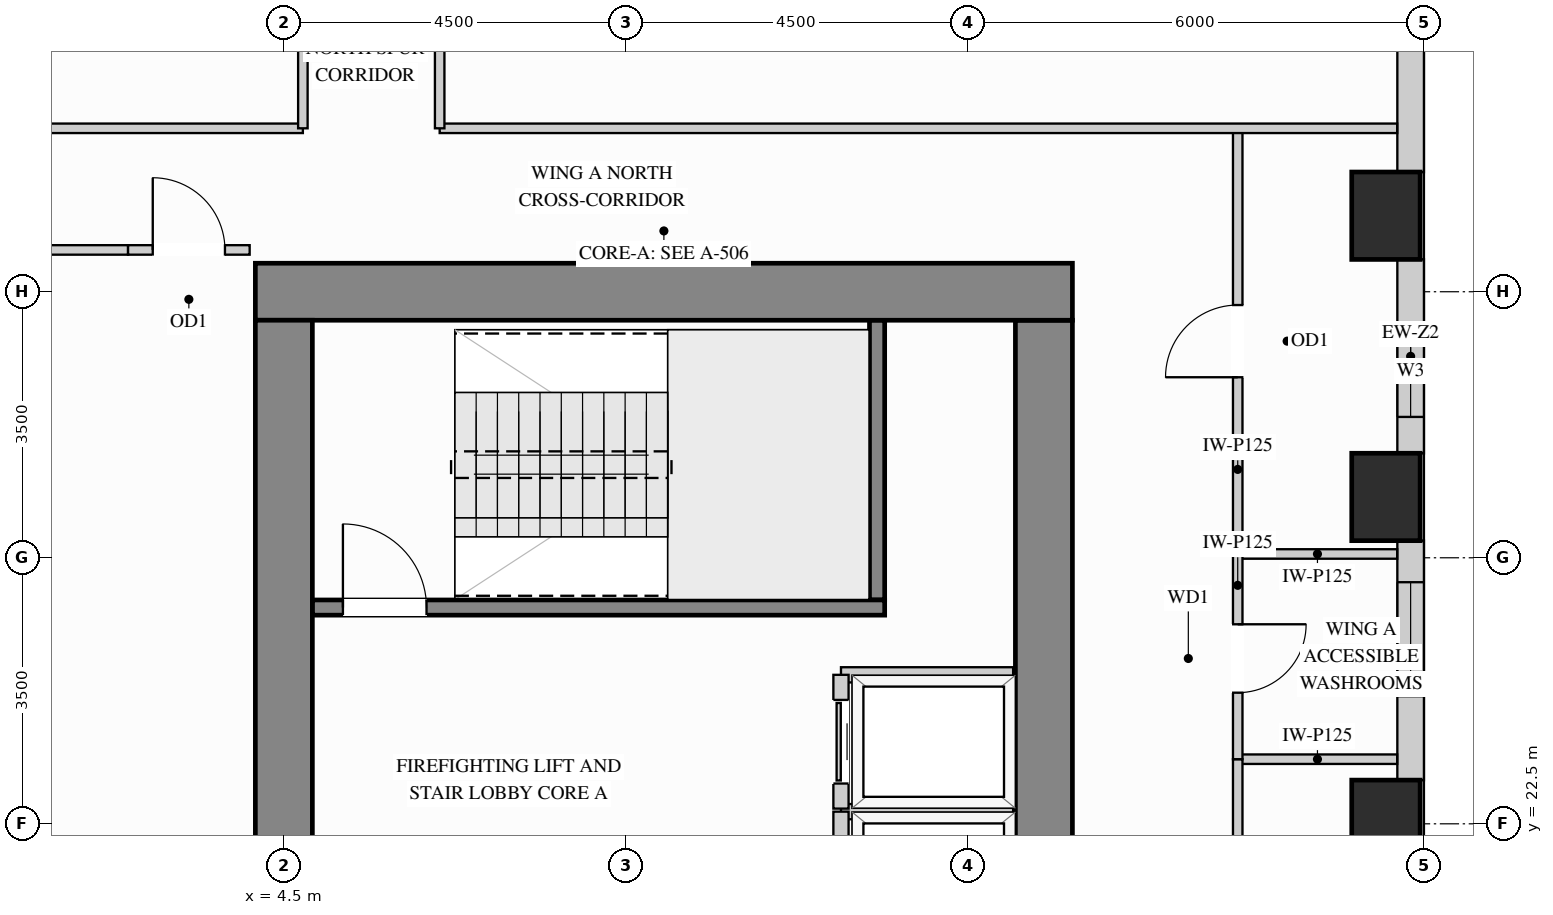
"""IFC4 building model, lengths in metres.
Left out: names, types, materials, properties, quantities, classifications, styles, units other than length and angle.
Written with IfcOpenShell. Run it as: python <this file> out.ifc"""

import sys

from ifc_helpers import new_model, si_unit, direction, frame, frame_2d, origin, origin_2d, place, context, subcontext, project, spatial, rectangle, extrude, source, transform, mapped, element, fill, save


model = new_model("IFC4")
c1 = context("Model", 3, precision=1e-05, world=origin(), true_north=direction((0.0, 1.0)))
c2 = subcontext(c1, "Body", "Model", "MODEL_VIEW")
j1 = project(units=[si_unit("LENGTHUNIT", "METRE"), si_unit("PLANEANGLEUNIT", "RADIAN")], contexts=[c1])
p1 = place(None, origin())
s1 = spatial("IfcSite", under=j1, at=p1, CompositionType="ELEMENT")
p2 = place(p1, origin())
s2 = spatial("IfcBuilding", under=s1, at=p2, CompositionType="ELEMENT")
p3 = place(p2, frame((0.0, 0.0, 95.4)))
s3 = spatial("IfcBuildingStorey", under=s2, at=p3, CompositionType="ELEMENT", Elevation=95.4)
m1 = source(origin(), c2, "Body", "SweptSolid", [
    extrude(rectangle(XDim=0.9, YDim=1.15, at=origin_2d()), origin(), (0.0, 0.0, 1.0), 3.38),
])
for number, where, z_axis, x_axis in (
    (1, (19.0, 22.5, 0.0), (0.0, 0.0, 1.0), (1.0, 0.0, 0.0)),
    (2, (19.0, 26.8, 0.0), (0.0, 0.0, 1.0), (1.0, 0.0, 0.0)),
    (3, (19.0, 30.5, 0.0), (0.0, 0.0, 1.0), (1.0, 0.0, 0.0)),
):
    element("IfcColumn", number, at=place(p3, frame(where, z_axis=z_axis, x_axis=x_axis)), inside=s3, PredefinedType="COLUMN", context=c2, shape_type="MappedRepresentation", body=[
        mapped(m1, transform((0.0, 0.0, 0.0), x_axis=(1.0, 0.0, 0.0), y_axis=(0.0, 1.0, 0.0), z_axis=(0.0, 0.0, 1.0))),
    ])
m2 = source(origin(), c2, "Body", "SweptSolid", [
    extrude(rectangle(XDim=8.245, YDim=0.75, at=frame_2d((4.123, 0.0))), origin(), (0.0, 0.0, 1.0), 3.38),
])
p4 = place(p3, frame((14.5, 20.88, 0.0), z_axis=(0.0, 0.0, 1.0), x_axis=(0.0, 1.0, 0.0)))
e4 = element("IfcWall", 4, at=p4, inside=s3, PredefinedType="SHEAR", context=c2, shape_type="MappedRepresentation", body=[
    mapped(m2, transform((0.0, 0.0, 0.0), x_axis=(1.0, 0.0, 0.0), y_axis=(0.0, 1.0, 0.0), z_axis=(0.0, 0.0, 1.0))),
])
m3 = source(origin(), c2, "Body", "SweptSolid", [
    extrude(rectangle(XDim=10.75, YDim=0.75, at=frame_2d((5.375, 0.0))), origin(), (0.0, 0.0, 1.0), 3.38),
])
p5 = place(p3, frame((4.125, 29.5, 0.0), z_axis=(0.0, 0.0, 1.0), x_axis=(1.0, 0.0, 0.0)))
e5 = element("IfcWall", 5, at=p5, inside=s3, PredefinedType="SHEAR", context=c2, shape_type="MappedRepresentation", body=[
    mapped(m3, transform((0.0, 0.0, 0.0), x_axis=(1.0, 0.0, 0.0), y_axis=(0.0, 1.0, 0.0), z_axis=(0.0, 0.0, 1.0))),
])
m4 = source(origin(), c2, "Body", "SweptSolid", [
    extrude(rectangle(XDim=20.25, YDim=0.75, at=frame_2d((10.125, 0.0))), origin(), (0.0, 0.0, 1.0), 3.38),
])
p6 = place(p3, frame((4.5, 8.875, 0.0), z_axis=(0.0, 0.0, 1.0), x_axis=(0.0, 1.0, 0.0)))
e6 = element("IfcWall", 6, at=p6, inside=s3, PredefinedType="SHEAR", context=c2, shape_type="MappedRepresentation", body=[
    mapped(m4, transform((0.0, 0.0, 0.0), x_axis=(1.0, 0.0, 0.0), y_axis=(0.0, 1.0, 0.0), z_axis=(0.0, 0.0, 1.0))),
])
p7 = place(p3, frame((19.325, 23.073, 0.0), z_axis=(0.0, 0.0, 1.0), x_axis=(0.0, 1.0, 0.0)))
e7 = element("IfcWall", 7, at=p7, inside=s3, PredefinedType="SOLIDWALL", context=c2, shape_type="SweptSolid", body=[
    extrude(rectangle(XDim=3.154, YDim=0.35, at=frame_2d((1.577, 0.0))), origin(), (0.0, 0.0, 1.0), 2.519),
])
p8 = place(p7, frame((1.105, 0.0, 0.78)))
e8 = element("IfcOpeningElement", 8, at=p8, cuts=e7, PredefinedType="OPENING", context=c2, shape_type="SweptSolid", body=[
    extrude(rectangle(XDim=1.5, YDim=1.559, at=frame_2d((0.75, 0.78))), frame((0.0, 0.185, 0.0), z_axis=(0.0, -1.0, 0.0), x_axis=(1.0, 0.0, 0.0)), (0.0, 0.0, 1.0), 0.37),
])
p9 = place(p3, frame((19.325, 27.373, 0.0), z_axis=(0.0, 0.0, 1.0), x_axis=(0.0, 1.0, 0.0)))
e9 = element("IfcWall", 9, at=p9, inside=s3, PredefinedType="SOLIDWALL", context=c2, shape_type="SweptSolid", body=[
    extrude(rectangle(XDim=2.554, YDim=0.35, at=frame_2d((1.277, 0.0))), origin(), (0.0, 0.0, 1.0), 2.519),
])
p10 = place(p9, frame((0.48, 0.0, 0.78)))
e10 = element("IfcOpeningElement", 10, at=p10, cuts=e9, PredefinedType="OPENING", context=c2, shape_type="SweptSolid", body=[
    extrude(rectangle(XDim=1.2, YDim=1.559, at=frame_2d((0.6, 0.78))), frame((0.0, 0.185, 0.0), z_axis=(0.0, -1.0, 0.0), x_axis=(1.0, 0.0, 0.0)), (0.0, 0.0, 1.0), 0.37),
])
m5 = source(origin(), c2, "Body", "SweptSolid", [
    extrude(rectangle(XDim=3.354, YDim=0.35, at=frame_2d((1.677, 0.0))), origin(), (0.0, 0.0, 1.0), 2.519),
])
p11 = place(p3, frame((19.325, 31.073, 0.0), z_axis=(0.0, 0.0, 1.0), x_axis=(0.0, 1.0, 0.0)))
e11 = element("IfcWall", 11, at=p11, inside=s3, PredefinedType="SOLIDWALL", context=c2, shape_type="MappedRepresentation", body=[
    mapped(m5, transform((0.0, 0.0, 0.0), x_axis=(1.0, 0.0, 0.0), y_axis=(0.0, 1.0, 0.0), z_axis=(0.0, 0.0, 1.0))),
])
m6 = source(origin(), c2, "Body", "SweptSolid", [
    extrude(rectangle(XDim=2.098, YDim=0.125, at=frame_2d((1.049, 0.0))), origin(), (0.0, 0.0, 1.0), 3.365),
])
for number, where, z_axis, x_axis in (
    (12, (17.05, 23.35, 0.0), (0.0, 0.0, 1.0), (1.0, 0.0, 0.0)),
    (13, (17.05, 26.05, 0.0), (0.0, 0.0, 1.0), (1.0, 0.0, 0.0)),
):
    element("IfcWall", number, at=place(p3, frame(where, z_axis=z_axis, x_axis=x_axis)), inside=s3, PredefinedType="PARTITIONING", context=c2, shape_type="MappedRepresentation", body=[
        mapped(m6, transform((0.0, 0.0, 0.0), x_axis=(1.0, 0.0, 0.0), y_axis=(0.0, 1.0, 0.0), z_axis=(0.0, 0.0, 1.0))),
    ])
p12 = place(p3, frame((17.05, 18.8, 0.0), z_axis=(0.0, 0.0, 1.0), x_axis=(0.0, 1.0, 0.0)))
e14 = element("IfcWall", 14, at=p12, inside=s3, PredefinedType="PARTITIONING", context=c2, shape_type="SweptSolid", body=[
    extrude(rectangle(XDim=4.55, YDim=0.125, at=frame_2d((2.275, 0.0))), origin(), (0.0, 0.0, 1.0), 3.365),
])
p13 = place(p12, frame((1.8, 0.0, 0.0)))
e15 = element("IfcOpeningElement", 15, at=p13, cuts=e14, PredefinedType="OPENING", context=c2, shape_type="SweptSolid", body=[
    extrude(rectangle(XDim=0.95, YDim=2.15, at=frame_2d((0.475, 1.075))), frame((0.0, 0.073, 0.0), z_axis=(0.0, -1.0, 0.0), x_axis=(1.0, 0.0, 0.0)), (0.0, 0.0, 1.0), 0.145),
])
p14 = place(p3, frame((17.05, 26.05, 0.0), z_axis=(0.0, 0.0, 1.0), x_axis=(0.0, 1.0, 0.0)))
e16 = element("IfcWall", 16, at=p14, inside=s3, PredefinedType="PARTITIONING", context=c2, shape_type="SweptSolid", body=[
    extrude(rectangle(XDim=5.6, YDim=0.125, at=frame_2d((2.8, 0.0))), origin(), (0.0, 0.0, 1.0), 3.365),
])
p15 = place(p14, frame((2.325, 0.0, 0.0)))
e17 = element("IfcOpeningElement", 17, at=p15, cuts=e16, PredefinedType="OPENING", context=c2, shape_type="SweptSolid", body=[
    extrude(rectangle(XDim=0.95, YDim=2.15, at=frame_2d((0.475, 1.075))), frame((0.0, 0.073, 0.0), z_axis=(0.0, -1.0, 0.0), x_axis=(1.0, 0.0, 0.0)), (0.0, 0.0, 1.0), 0.145),
])
p16 = place(p3, frame((17.05, 23.35, 0.0), z_axis=(0.0, 0.0, 1.0), x_axis=(0.0, 1.0, 0.0)))
e18 = element("IfcWall", 18, at=p16, inside=s3, PredefinedType="PARTITIONING", context=c2, shape_type="SweptSolid", body=[
    extrude(rectangle(XDim=2.7, YDim=0.125, at=frame_2d((1.35, 0.0))), origin(), (0.0, 0.0, 1.0), 3.365),
])
p17 = place(p16, frame((0.875, 0.0, 0.0)))
e19 = element("IfcOpeningElement", 19, at=p17, cuts=e18, PredefinedType="OPENING", context=c2, shape_type="SweptSolid", body=[
    extrude(rectangle(XDim=0.9, YDim=2.15, at=frame_2d((0.45, 1.075))), frame((0.0, 0.073, 0.0), z_axis=(0.0, -1.0, 0.0), x_axis=(1.0, 0.0, 0.0)), (0.0, 0.0, 1.0), 0.145),
])
m7 = source(origin(), c2, "Body", "SweptSolid", [
    extrude(rectangle(XDim=12.598, YDim=0.125, at=frame_2d((6.299, 0.0))), origin(), (0.0, 0.0, 1.0), 2.828),
])
p18 = place(p3, frame((6.55, 31.65, 0.0), z_axis=(0.0, 0.0, 1.0), x_axis=(1.0, 0.0, 0.0)))
e20 = element("IfcWall", 20, at=p18, inside=s3, PredefinedType="PARTITIONING", context=c2, shape_type="MappedRepresentation", body=[
    mapped(m7, transform((0.0, 0.0, 0.0), x_axis=(1.0, 0.0, 0.0), y_axis=(0.0, 1.0, 0.0), z_axis=(0.0, 0.0, 1.0))),
])
m8 = source(origin(), c2, "Body", "SweptSolid", [
    extrude(rectangle(XDim=4.398, YDim=0.125, at=frame_2d((2.199, 0.0))), origin(), (0.0, 0.0, 1.0), 2.828),
])
p19 = place(p3, frame((0.352, 31.65, 0.0), z_axis=(0.0, 0.0, 1.0), x_axis=(1.0, 0.0, 0.0)))
e21 = element("IfcWall", 21, at=p19, inside=s3, PredefinedType="PARTITIONING", context=c2, shape_type="MappedRepresentation", body=[
    mapped(m8, transform((0.0, 0.0, 0.0), x_axis=(1.0, 0.0, 0.0), y_axis=(0.0, 1.0, 0.0), z_axis=(0.0, 0.0, 1.0))),
])
m9 = source(origin(), c2, "Body", "SweptSolid", [
    extrude(rectangle(XDim=1.26, YDim=0.125, at=frame_2d((0.63, 0.0))), origin(), (0.0, 0.0, 1.0), 3.365),
])
p20 = place(p3, frame((1.19, 30.05, 0.0), z_axis=(0.0, 0.0, 1.0), x_axis=(1.0, 0.0, 0.0)))
e22 = element("IfcWall", 22, at=p20, inside=s3, PredefinedType="PARTITIONING", context=c2, shape_type="MappedRepresentation", body=[
    mapped(m9, transform((0.0, 0.0, 0.0), x_axis=(1.0, 0.0, 0.0), y_axis=(0.0, 1.0, 0.0), z_axis=(0.0, 0.0, 1.0))),
])
p21 = place(p3, frame((2.45, 30.05, 0.0), z_axis=(0.0, 0.0, 1.0), x_axis=(1.0, 0.0, 0.0)))
e23 = element("IfcWall", 23, at=p21, inside=s3, PredefinedType="PARTITIONING", context=c2, shape_type="SweptSolid", body=[
    extrude(rectangle(XDim=1.6, YDim=0.125, at=frame_2d((0.8, 0.0))), origin(), (0.0, 0.0, 1.0), 3.365),
])
p22 = place(p21, frame((0.325, 0.0, 0.0)))
e24 = element("IfcOpeningElement", 24, at=p22, cuts=e23, PredefinedType="OPENING", context=c2, shape_type="SweptSolid", body=[
    extrude(rectangle(XDim=0.95, YDim=2.15, at=frame_2d((0.475, 1.075))), frame((0.0, 0.073, 0.0), z_axis=(0.0, -1.0, 0.0), x_axis=(1.0, 0.0, 0.0)), (0.0, 0.0, 1.0), 0.145),
])
p23 = place(p3, frame((6.55, 31.65, 0.0), z_axis=(0.0, 0.0, 1.0), x_axis=(0.0, 1.0, 0.0)))
e25 = element("IfcWall", 25, at=p23, inside=s3, PredefinedType="PARTITIONING", context=c2, shape_type="SweptSolid", body=[
    extrude(rectangle(XDim=5.427, YDim=0.125, at=frame_2d((2.713, 0.0))), origin(), (0.0, 0.0, 1.0), 3.365),
])
p24 = place(p23, frame((2.239, 0.0, 0.0)))
e26 = element("IfcOpeningElement", 26, at=p24, cuts=e25, PredefinedType="OPENING", context=c2, shape_type="SweptSolid", body=[
    extrude(rectangle(XDim=0.95, YDim=2.15, at=frame_2d((0.475, 1.075))), frame((0.0, 0.073, 0.0), z_axis=(0.0, -1.0, 0.0), x_axis=(1.0, 0.0, 0.0)), (0.0, 0.0, 1.0), 0.145),
])
p25 = place(p3, frame((4.75, 31.65, 0.0), z_axis=(0.0, 0.0, 1.0), x_axis=(0.0, 1.0, 0.0)))
e27 = element("IfcWall", 27, at=p25, inside=s3, PredefinedType="PARTITIONING", context=c2, shape_type="SweptSolid", body=[
    extrude(rectangle(XDim=10.05, YDim=0.125, at=frame_2d((5.025, 0.0))), origin(), (0.0, 0.0, 1.0), 3.365),
])
p26 = place(p25, frame((4.245, 0.0, 0.0)))
e28 = element("IfcOpeningElement", 28, at=p26, cuts=e27, PredefinedType="OPENING", context=c2, shape_type="SweptSolid", body=[
    extrude(rectangle(XDim=0.95, YDim=2.15, at=frame_2d((0.475, 1.075))), frame((0.0, 0.073, 0.0), z_axis=(0.0, -1.0, 0.0), x_axis=(1.0, 0.0, 0.0)), (0.0, 0.0, 1.0), 0.145),
])
m10 = source(origin(), c2, "Body", "SweptSolid", [
    extrude(rectangle(XDim=2.265, YDim=0.2, at=frame_2d((1.132, 0.0))), origin(), (0.0, 0.0, 1.0), 3.365),
])
p27 = place(p3, frame((11.83, 22.66, 0.0), z_axis=(0.0, 0.0, 1.0), x_axis=(1.0, 0.0, 0.0)))
e29 = element("IfcWall", 29, at=p27, inside=s3, PredefinedType="PARTITIONING", context=c2, shape_type="MappedRepresentation", body=[
    mapped(m10, transform((0.0, 0.0, 0.0), x_axis=(1.0, 0.0, 0.0), y_axis=(0.0, 1.0, 0.0), z_axis=(0.0, 0.0, 1.0))),
])
p28 = place(p3, frame((11.83, 20.9, 0.0), z_axis=(0.0, 0.0, 1.0), x_axis=(0.0, 1.0, 0.0)))
e30 = element("IfcWall", 30, at=p28, inside=s3, PredefinedType="PARTITIONING", context=c2, shape_type="SweptSolid", body=[
    extrude(rectangle(XDim=1.76, YDim=0.2, at=frame_2d((0.88, 0.0))), origin(), (0.0, 0.0, 1.0), 3.365),
])
p29 = place(p28, frame((0.33, 0.0, 0.0)))
e31 = element("IfcOpeningElement", 31, at=p29, cuts=e30, PredefinedType="OPENING", context=c2, shape_type="SweptSolid", body=[
    extrude(rectangle(XDim=1.1, YDim=2.2, at=frame_2d((0.55, 1.1))), frame((0.0, 0.11, 0.0), z_axis=(0.0, -1.0, 0.0), x_axis=(1.0, 0.0, 0.0)), (0.0, 0.0, 1.0), 0.22),
])
p30 = place(p3, frame((11.83, 24.46, 0.0), z_axis=(0.0, 0.0, 1.0), x_axis=(1.0, 0.0, 0.0)))
e32 = element("IfcWall", 32, at=p30, inside=s3, PredefinedType="PARTITIONING", context=c2, shape_type="MappedRepresentation", body=[
    mapped(m10, transform((0.0, 0.0, 0.0), x_axis=(1.0, 0.0, 0.0), y_axis=(0.0, 1.0, 0.0), z_axis=(0.0, 0.0, 1.0))),
])
p31 = place(p3, frame((11.83, 22.7, 0.0), z_axis=(0.0, 0.0, 1.0), x_axis=(0.0, 1.0, 0.0)))
e33 = element("IfcWall", 33, at=p31, inside=s3, PredefinedType="PARTITIONING", context=c2, shape_type="SweptSolid", body=[
    extrude(rectangle(XDim=1.76, YDim=0.2, at=frame_2d((0.88, 0.0))), origin(), (0.0, 0.0, 1.0), 3.365),
])
p32 = place(p31, frame((0.33, 0.0, 0.0)))
e34 = element("IfcOpeningElement", 34, at=p32, cuts=e33, PredefinedType="OPENING", context=c2, shape_type="SweptSolid", body=[
    extrude(rectangle(XDim=1.1, YDim=2.2, at=frame_2d((0.55, 1.1))), frame((0.0, 0.11, 0.0), z_axis=(0.0, -1.0, 0.0), x_axis=(1.0, 0.0, 0.0)), (0.0, 0.0, 1.0), 0.22),
])
m11 = source(origin(), c2, "Body", "SweptSolid", [
    extrude(rectangle(XDim=3.678, YDim=0.2, at=frame_2d((1.839, 0.0))), origin(), (0.0, 0.0, 1.0), 3.38),
])
p33 = place(p3, frame((12.305, 25.445, 0.0), z_axis=(0.0, 0.0, 1.0), x_axis=(0.0, 1.0, 0.0)))
e35 = element("IfcWall", 35, at=p33, inside=s3, PredefinedType="SHEAR", context=c2, shape_type="MappedRepresentation", body=[
    mapped(m11, transform((0.0, 0.0, 0.0), x_axis=(1.0, 0.0, 0.0), y_axis=(0.0, 1.0, 0.0), z_axis=(0.0, 0.0, 1.0))),
])
p34 = place(p3, frame((4.877, 25.345, 0.0), z_axis=(0.0, 0.0, 1.0), x_axis=(1.0, 0.0, 0.0)))
e36 = element("IfcWall", 36, at=p34, inside=s3, PredefinedType="SHEAR", context=c2, shape_type="SweptSolid", body=[
    extrude(rectangle(XDim=7.528, YDim=0.2, at=frame_2d((3.764, 0.0))), origin(), (0.0, 0.0, 1.0), 3.38),
])
p35 = place(p34, frame((0.4, 0.0, 0.0)))
e37 = element("IfcOpeningElement", 37, at=p35, cuts=e36, PredefinedType="OPENING", context=c2, shape_type="SweptSolid", body=[
    extrude(rectangle(XDim=1.1, YDim=2.15, at=frame_2d((0.55, 1.075))), frame((0.0, 0.11, 0.0), z_axis=(0.0, -1.0, 0.0), x_axis=(1.0, 0.0, 0.0)), (0.0, 0.0, 1.0), 0.22),
])
m12 = source(origin(), c2, "Body", "SweptSolid", [
    extrude(rectangle(XDim=1.1, YDim=2.2, at=frame_2d((0.55, 1.1))), frame((0.0, 0.025, 0.0), z_axis=(0.0, -1.0, 0.0), x_axis=(1.0, 0.0, 0.0)), (0.0, 0.0, 1.0), 0.05),
])
p36 = place(p32, origin())
e38 = element("IfcDoor", 38, at=p36, inside=s3, OperationType="SLIDING_TO_LEFT", PredefinedType="DOOR", context=c2, shape_type="MappedRepresentation", body=[
    mapped(m12, transform((0.0, 0.0, 0.0), x_axis=(1.0, 0.0, 0.0), y_axis=(0.0, 1.0, 0.0), z_axis=(0.0, 0.0, 1.0))),
])
fill(e34, e38)
m13 = source(origin(), c2, "Body", "SweptSolid", [
    extrude(rectangle(XDim=0.95, YDim=2.15, at=frame_2d((0.475, 1.075))), frame((0.0, 0.025, 0.0), z_axis=(0.0, -1.0, 0.0), x_axis=(1.0, 0.0, 0.0)), (0.0, 0.0, 1.0), 0.05),
])
p37 = place(p15, origin())
e39 = element("IfcDoor", 39, at=p37, inside=s3, OperationType="SINGLE_SWING_LEFT", PredefinedType="DOOR", context=c2, shape_type="MappedRepresentation", body=[
    mapped(m13, transform((0.0, 0.0, 0.0), x_axis=(1.0, 0.0, 0.0), y_axis=(0.0, 1.0, 0.0), z_axis=(0.0, 0.0, 1.0))),
])
fill(e17, e39)
p38 = place(p22, origin())
e40 = element("IfcDoor", 40, at=p38, inside=s3, OperationType="SINGLE_SWING_LEFT", PredefinedType="DOOR", context=c2, shape_type="MappedRepresentation", body=[
    mapped(m13, transform((0.0, 0.0, 0.0), x_axis=(1.0, 0.0, 0.0), y_axis=(0.0, 1.0, 0.0), z_axis=(0.0, 0.0, 1.0))),
])
fill(e24, e40)
m14 = source(origin(), c2, "Body", "SweptSolid", [
    extrude(rectangle(XDim=1.1, YDim=2.15, at=frame_2d((0.55, 1.075))), frame((0.0, 0.025, 0.0), z_axis=(0.0, -1.0, 0.0), x_axis=(1.0, 0.0, 0.0)), (0.0, 0.0, 1.0), 0.05),
])
p39 = place(p35, origin())
e41 = element("IfcDoor", 41, at=p39, inside=s3, OperationType="SINGLE_SWING_LEFT", PredefinedType="DOOR", context=c2, shape_type="MappedRepresentation", body=[
    mapped(m14, transform((0.0, 0.0, 0.0), x_axis=(1.0, 0.0, 0.0), y_axis=(0.0, 1.0, 0.0), z_axis=(0.0, 0.0, 1.0))),
])
fill(e37, e41)
m15 = source(origin(), c2, "Body", "SweptSolid", [
    extrude(rectangle(XDim=0.9, YDim=2.15, at=frame_2d((0.45, 1.075))), frame((0.0, 0.025, 0.0), z_axis=(0.0, -1.0, 0.0), x_axis=(1.0, 0.0, 0.0)), (0.0, 0.0, 1.0), 0.05),
])
p40 = place(p17, origin())
e42 = element("IfcDoor", 42, at=p40, inside=s3, OperationType="SINGLE_SWING_RIGHT", PredefinedType="DOOR", context=c2, shape_type="MappedRepresentation", body=[
    mapped(m15, transform((0.0, 0.0, 0.0), x_axis=(1.0, 0.0, 0.0), y_axis=(0.0, 1.0, 0.0), z_axis=(0.0, 0.0, 1.0))),
])
fill(e19, e42)
m16 = source(origin(), c2, "Body", "SweptSolid", [
    extrude(rectangle(XDim=1.2, YDim=1.559, at=frame_2d((0.6, 0.78))), frame((0.0, 0.03, 0.0), z_axis=(0.0, -1.0, 0.0), x_axis=(1.0, 0.0, 0.0)), (0.0, 0.0, 1.0), 0.06),
])
p41 = place(p10, origin())
e43 = element("IfcWindow", 43, at=p41, inside=s3, PartitioningType="SINGLE_PANEL", PredefinedType="WINDOW", context=c2, shape_type="MappedRepresentation", body=[
    mapped(m16, transform((0.0, 0.0, 0.0), x_axis=(1.0, 0.0, 0.0), y_axis=(0.0, 1.0, 0.0), z_axis=(0.0, 0.0, 1.0))),
])
fill(e10, e43)
m17 = source(origin(), c2, "Body", "SweptSolid", [
    extrude(rectangle(XDim=1.5, YDim=1.559, at=frame_2d((0.75, 0.78))), frame((0.0, 0.03, 0.0), z_axis=(0.0, -1.0, 0.0), x_axis=(1.0, 0.0, 0.0)), (0.0, 0.0, 1.0), 0.06),
])
p42 = place(p8, origin())
e44 = element("IfcWindow", 44, at=p42, inside=s3, PartitioningType="SINGLE_PANEL", PredefinedType="WINDOW", context=c2, shape_type="MappedRepresentation", body=[
    mapped(m17, transform((0.0, 0.0, 0.0), x_axis=(1.0, 0.0, 0.0), y_axis=(0.0, 1.0, 0.0), z_axis=(0.0, 0.0, 1.0))),
])
fill(e8, e44)
save(model, sys.argv[1])
